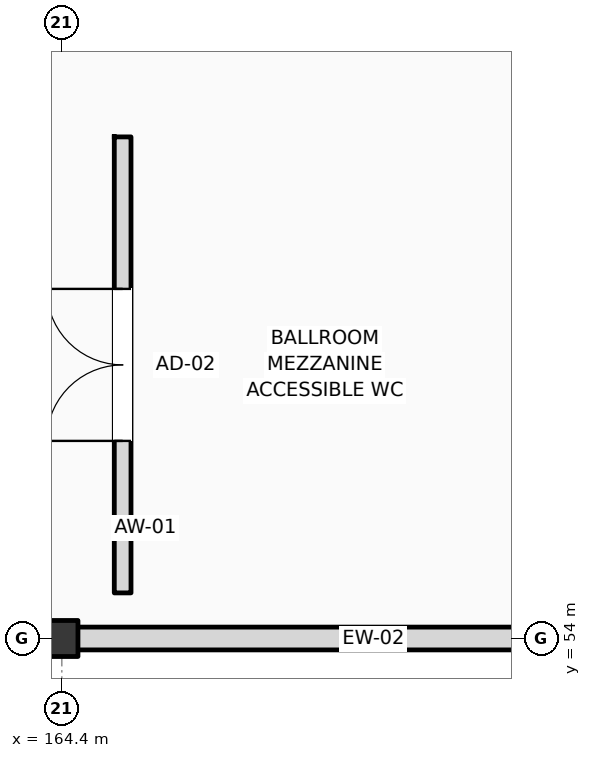
"""IFC4 building model, lengths in metres.
Left out: names, types, materials, properties, quantities, classifications, styles, units other than length and angle.
Written with IfcOpenShell. Run it as: python <this file> out.ifc"""

import sys

from ifc_helpers import new_model, si_unit, direction, frame, frame_2d, origin, origin_2d, place, context, subcontext, project, spatial, rectangle, i_section, extrude, element, fill, save


model = new_model("IFC4")
c1 = context("Model", 3, precision=1e-05, world=origin(), true_north=direction((0.0, 1.0)))
c2 = subcontext(c1, "Body", "Model", "MODEL_VIEW")
j1 = project(units=[si_unit("LENGTHUNIT", "METRE"), si_unit("PLANEANGLEUNIT", "RADIAN")], contexts=[c1])
p1 = place(None, origin())
s1 = spatial("IfcSite", under=j1, at=p1, CompositionType="ELEMENT")
p2 = place(p1, origin())
s2 = spatial("IfcBuilding", under=s1, at=p2, CompositionType="ELEMENT")
p3 = place(p2, frame((0.0, 0.0, 6.0)))
s3 = spatial("IfcBuildingStorey", under=s2, at=p3, CompositionType="ELEMENT", Elevation=6.0)
p4 = place(p3, frame((164.4, 54.0, 0.0), z_axis=(0.0, 0.0, 1.0), x_axis=(1.0, 0.0, 0.0)))
e1 = element("IfcColumn", 1, at=p4, inside=s3, PredefinedType="COLUMN", context=c2, shape_type="SweptSolid", body=[
    extrude(i_section(OverallWidth=0.424, OverallDepth=0.474, WebThickness=0.045, FlangeThickness=0.055, FilletRadius=0.015, at=origin_2d()), origin(), (0.0, 0.0, 1.0), 5.4),
])
p5 = place(p3, frame((164.4, 54.0, 0.0), z_axis=(0.0, 0.0, 1.0), x_axis=(1.0, 0.0, 0.0)))
e2 = element("IfcWall", 2, at=p5, inside=s3, PredefinedType="STANDARD", context=c2, shape_type="SweptSolid", body=[
    extrude(rectangle(XDim=7.6, YDim=0.3, at=frame_2d((3.8, 0.0))), origin(), (0.0, 0.0, 1.0), 4.54),
])
p6 = place(p3, frame((165.2, 54.6, 0.0), z_axis=(0.0, 0.0, 1.0), x_axis=(0.0, 1.0, 0.0)))
e3 = element("IfcWall", 3, at=p6, inside=s3, PredefinedType="PARTITIONING", context=c2, shape_type="SweptSolid", body=[
    extrude(rectangle(XDim=6.0, YDim=0.22, at=frame_2d((3.0, 0.0))), origin(), (0.0, 0.0, 1.0), 5.05),
])
p7 = place(p6, frame((2.0, 0.0, 0.0)))
e4 = element("IfcOpeningElement", 4, at=p7, cuts=e3, PredefinedType="OPENING", context=c2, shape_type="SweptSolid", body=[
    extrude(rectangle(XDim=2.0, YDim=2.35, at=frame_2d((1.0, 1.175))), frame((0.0, 0.12, 0.0), z_axis=(0.0, -1.0, 0.0), x_axis=(1.0, 0.0, 0.0)), (0.0, 0.0, 1.0), 0.24),
])
p8 = place(p7, origin())
e5 = element("IfcDoor", 5, at=p8, inside=s3, OperationType="DOUBLE_SWING_LEFT", PredefinedType="DOOR", context=c2, shape_type="SweptSolid", body=[
    extrude(rectangle(XDim=2.0, YDim=2.35, at=frame_2d((1.0, 1.175))), frame((0.0, 0.025, 0.0), z_axis=(0.0, -1.0, 0.0), x_axis=(1.0, 0.0, 0.0)), (0.0, 0.0, 1.0), 0.05),
])
fill(e4, e5)
save(model, sys.argv[1])
